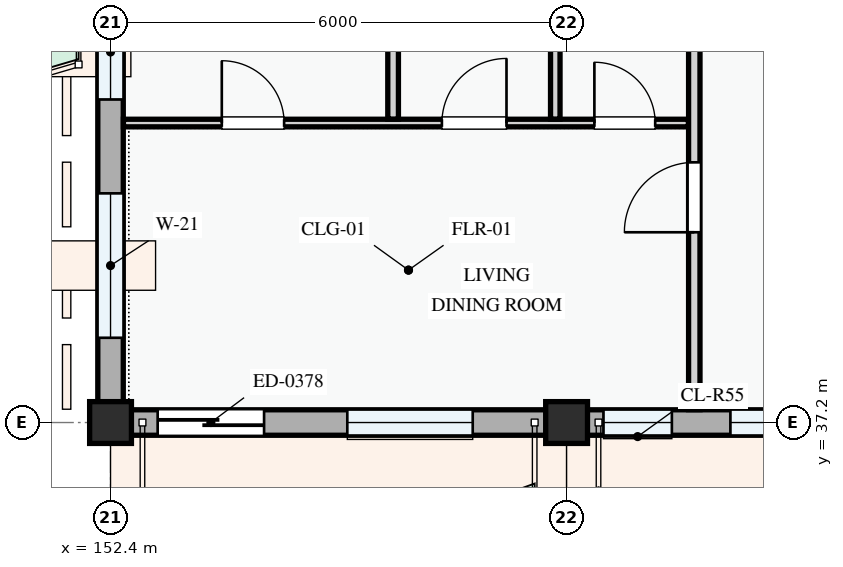
"""IFC4 building model, lengths in metres.
Left out: names, types, materials, properties, quantities, classifications, styles, units other than length and angle.
Written with IfcOpenShell. Run it as: python <this file> out.ifc"""

import sys

from ifc_helpers import new_model, si_unit, direction, frame, frame_2d, origin, origin_2d, place, context, subcontext, project, spatial, rectangle, extrude, element, fill, save


model = new_model("IFC4")
c1 = context("Model", 3, precision=1e-05, world=origin(), true_north=direction((0.0, 1.0)))
c2 = subcontext(c1, "Body", "Model", "MODEL_VIEW")
j1 = project(units=[si_unit("LENGTHUNIT", "METRE"), si_unit("PLANEANGLEUNIT", "RADIAN")], contexts=[c1])
p1 = place(None, origin())
s1 = spatial("IfcSite", under=j1, at=p1, CompositionType="ELEMENT")
p2 = place(p1, origin())
s2 = spatial("IfcBuilding", under=s1, at=p2, CompositionType="ELEMENT")
p3 = place(p2, frame((0.0, 0.0, 8.1)))
s3 = spatial("IfcBuildingStorey", under=s2, at=p3, CompositionType="ELEMENT", Elevation=8.1)
for number, where, z_axis, x_axis in (
    (1, (152.4, 37.2, 0.0), (0.0, 0.0, 1.0), (1.0, 0.0, 0.0)),
    (2, (158.4, 37.2, 0.0), (0.0, 0.0, 1.0), (1.0, 0.0, 0.0)),
):
    element("IfcColumn", number, at=place(p3, frame(where, z_axis=z_axis, x_axis=x_axis)), inside=s3, PredefinedType="COLUMN", context=c2, shape_type="SweptSolid", body=[
        extrude(rectangle(XDim=0.55, YDim=0.55, at=origin_2d()), origin(), (0.0, 0.0, 1.0), 3.3),
    ])
p4 = place(p3, frame((152.4, 43.2, 0.0), z_axis=(0.0, 0.0, 1.0), x_axis=(0.0, -1.0, 0.0)))
e3 = element("IfcWall", 3, at=p4, inside=s3, PredefinedType="STANDARD", context=c2, shape_type="SweptSolid", body=[
    extrude(rectangle(XDim=6.0, YDim=0.335, at=frame_2d((3.0, 0.0))), origin(), (0.0, 0.0, 1.0), 2.575),
])
p5 = place(p4, frame((0.5, 0.0, 0.78)))
e4 = element("IfcOpeningElement", 4, at=p5, cuts=e3, PredefinedType="OPENING", context=c2, shape_type="SweptSolid", body=[
    extrude(rectangle(XDim=1.25, YDim=1.3, at=frame_2d((0.625, 0.65))), frame((0.0, 0.177, 0.0), z_axis=(0.0, -1.0, 0.0), x_axis=(1.0, 0.0, 0.0)), (0.0, 0.0, 1.0), 0.355),
])
p6 = place(p4, frame((2.985, 0.0, 0.78)))
e5 = element("IfcOpeningElement", 5, at=p6, cuts=e3, PredefinedType="OPENING", context=c2, shape_type="SweptSolid", body=[
    extrude(rectangle(XDim=1.9, YDim=1.55, at=frame_2d((0.95, 0.775))), frame((0.0, 0.177, 0.0), z_axis=(0.0, -1.0, 0.0), x_axis=(1.0, 0.0, 0.0)), (0.0, 0.0, 1.0), 0.355),
])
p7 = place(p3, frame((152.4, 37.2, 0.0), z_axis=(0.0, 0.0, 1.0), x_axis=(1.0, 0.0, 0.0)))
e6 = element("IfcWall", 6, at=p7, inside=s3, PredefinedType="STANDARD", context=c2, shape_type="SweptSolid", body=[
    extrude(rectangle(XDim=6.0, YDim=0.335, at=frame_2d((3.0, 0.0))), origin(), (0.0, 0.0, 1.0), 2.475),
])
p8 = place(p7, frame((0.62, 0.0, 0.0)))
e7 = element("IfcOpeningElement", 7, at=p8, cuts=e6, PredefinedType="OPENING", context=c2, shape_type="SweptSolid", body=[
    extrude(rectangle(XDim=1.4, YDim=2.2, at=frame_2d((0.7, 1.1))), frame((0.0, 0.177, 0.0), z_axis=(0.0, -1.0, 0.0), x_axis=(1.0, 0.0, 0.0)), (0.0, 0.0, 1.0), 0.355),
])
p9 = place(p7, frame((3.115, 0.0, 0.78)))
e8 = element("IfcOpeningElement", 8, at=p9, cuts=e6, PredefinedType="OPENING", context=c2, shape_type="SweptSolid", body=[
    extrude(rectangle(XDim=1.65, YDim=1.5, at=frame_2d((0.825, 0.75))), frame((0.0, 0.177, 0.0), z_axis=(0.0, -1.0, 0.0), x_axis=(1.0, 0.0, 0.0)), (0.0, 0.0, 1.0), 0.355),
])
p10 = place(p3, frame((158.4, 37.2, 0.0), z_axis=(0.0, 0.0, 1.0), x_axis=(1.0, 0.0, 0.0)))
e9 = element("IfcWall", 9, at=p10, inside=s3, PredefinedType="STANDARD", context=c2, shape_type="SweptSolid", body=[
    extrude(rectangle(XDim=8.4, YDim=0.335, at=frame_2d((4.2, 0.0))), origin(), (0.0, 0.0, 1.0), 2.375),
])
p11 = place(p10, frame((3.91, 0.0, 0.0)))
e10 = element("IfcOpeningElement", 10, at=p11, cuts=e9, PredefinedType="OPENING", context=c2, shape_type="SweptSolid", body=[
    extrude(rectangle(XDim=1.5, YDim=2.2, at=frame_2d((0.75, 1.1))), frame((0.0, 0.177, 0.0), z_axis=(0.0, -1.0, 0.0), x_axis=(1.0, 0.0, 0.0)), (0.0, 0.0, 1.0), 0.355),
])
p12 = place(p10, frame((0.485, 0.0, 0.78)))
e11 = element("IfcOpeningElement", 11, at=p12, cuts=e9, PredefinedType="OPENING", context=c2, shape_type="SweptSolid", body=[
    extrude(rectangle(XDim=0.9, YDim=1.2, at=frame_2d((0.45, 0.6))), frame((0.0, 0.177, 0.0), z_axis=(0.0, -1.0, 0.0), x_axis=(1.0, 0.0, 0.0)), (0.0, 0.0, 1.0), 0.355),
])
p13 = place(p10, frame((2.155, 0.0, 0.78)))
e12 = element("IfcOpeningElement", 12, at=p13, cuts=e9, PredefinedType="OPENING", context=c2, shape_type="SweptSolid", body=[
    extrude(rectangle(XDim=0.95, YDim=1.15, at=frame_2d((0.475, 0.575))), frame((0.0, 0.177, 0.0), z_axis=(0.0, -1.0, 0.0), x_axis=(1.0, 0.0, 0.0)), (0.0, 0.0, 1.0), 0.355),
])
p14 = place(p10, frame((6.025, 0.0, 0.78)))
e13 = element("IfcOpeningElement", 13, at=p14, cuts=e9, PredefinedType="OPENING", context=c2, shape_type="SweptSolid", body=[
    extrude(rectangle(XDim=1.62, YDim=1.38, at=frame_2d((0.81, 0.69))), frame((0.0, 0.177, 0.0), z_axis=(0.0, -1.0, 0.0), x_axis=(1.0, 0.0, 0.0)), (0.0, 0.0, 1.0), 0.355),
])
p15 = place(p3, frame((152.57, 41.14, 0.0), z_axis=(0.0, 0.0, 1.0), x_axis=(1.0, 0.0, 0.0)))
e14 = element("IfcWall", 14, at=p15, inside=s3, PredefinedType="PARTITIONING", context=c2, shape_type="SweptSolid", body=[
    extrude(rectangle(XDim=7.433, YDim=0.1, at=frame_2d((3.717, 0.0))), origin(), (0.0, 0.0, 1.0), 3.0),
])
p16 = place(p15, frame((1.294, 0.0, 0.0)))
e15 = element("IfcOpeningElement", 15, at=p16, cuts=e14, PredefinedType="OPENING", context=c2, shape_type="SweptSolid", body=[
    extrude(rectangle(XDim=0.82, YDim=2.08, at=frame_2d((0.41, 1.04))), frame((0.0, 0.06, 0.0), z_axis=(0.0, -1.0, 0.0), x_axis=(1.0, 0.0, 0.0)), (0.0, 0.0, 1.0), 0.12),
])
p17 = place(p15, frame((4.19, 0.0, 0.0)))
e16 = element("IfcOpeningElement", 16, at=p17, cuts=e14, PredefinedType="OPENING", context=c2, shape_type="SweptSolid", body=[
    extrude(rectangle(XDim=0.85, YDim=2.1, at=frame_2d((0.425, 1.05))), frame((0.0, 0.06, 0.0), z_axis=(0.0, -1.0, 0.0), x_axis=(1.0, 0.0, 0.0)), (0.0, 0.0, 1.0), 0.12),
])
p18 = place(p15, frame((6.196, 0.0, 0.0)))
e17 = element("IfcOpeningElement", 17, at=p18, cuts=e14, PredefinedType="OPENING", context=c2, shape_type="SweptSolid", body=[
    extrude(rectangle(XDim=0.8, YDim=2.1, at=frame_2d((0.4, 1.05))), frame((0.0, 0.06, 0.0), z_axis=(0.0, -1.0, 0.0), x_axis=(1.0, 0.0, 0.0)), (0.0, 0.0, 1.0), 0.12),
])
p19 = place(p3, frame((156.118, 41.192, 0.0), z_axis=(0.0, 0.0, 1.0), x_axis=(0.0, 1.0, 0.0)))
e18 = element("IfcWall", 18, at=p19, inside=s3, PredefinedType="PARTITIONING", context=c2, shape_type="SweptSolid", body=[
    extrude(rectangle(XDim=3.716, YDim=0.14, at=frame_2d((1.858, 0.0))), origin(), (0.0, 0.0, 1.0), 3.0),
])
p20 = place(p3, frame((158.251, 41.192, 0.0), z_axis=(0.0, 0.0, 1.0), x_axis=(0.0, 1.0, 0.0)))
e19 = element("IfcWall", 19, at=p20, inside=s3, PredefinedType="PARTITIONING", context=c2, shape_type="SweptSolid", body=[
    extrude(rectangle(XDim=3.716, YDim=0.125, at=frame_2d((1.858, 0.0))), origin(), (0.0, 0.0, 1.0), 2.425),
])
p21 = place(p3, frame((160.08, 37.369, 0.0), z_axis=(0.0, 0.0, 1.0), x_axis=(0.0, 1.0, 0.0)))
e20 = element("IfcWall", 20, at=p21, inside=s3, PredefinedType="PARTITIONING", context=c2, shape_type="SweptSolid", body=[
    extrude(rectangle(XDim=20.371, YDim=0.15, at=frame_2d((10.185, 0.0))), origin(), (0.0, 0.0, 1.0), 3.0),
])
p22 = place(p21, frame((2.333, 0.0, 0.0)))
e21 = element("IfcOpeningElement", 21, at=p22, cuts=e20, PredefinedType="OPENING", context=c2, shape_type="SweptSolid", body=[
    extrude(rectangle(XDim=0.92, YDim=2.1, at=frame_2d((0.46, 1.05))), frame((0.0, 0.085, 0.0), z_axis=(0.0, -1.0, 0.0), x_axis=(1.0, 0.0, 0.0)), (0.0, 0.0, 1.0), 0.17),
])
p23 = place(p21, frame((9.601, 0.0, 0.0)))
e22 = element("IfcOpeningElement", 22, at=p23, cuts=e20, PredefinedType="OPENING", context=c2, shape_type="SweptSolid", body=[
    extrude(rectangle(XDim=0.92, YDim=2.1, at=frame_2d((0.46, 1.05))), frame((0.0, 0.085, 0.0), z_axis=(0.0, -1.0, 0.0), x_axis=(1.0, 0.0, 0.0)), (0.0, 0.0, 1.0), 0.17),
])
p24 = place(p5, origin())
e23 = element("IfcWindow", 23, at=p24, inside=s3, PartitioningType="SINGLE_PANEL", PredefinedType="WINDOW", context=c2, shape_type="SweptSolid", body=[
    extrude(rectangle(XDim=1.25, YDim=1.3, at=frame_2d((0.625, 0.65))), frame((0.0, 0.03, 0.0), z_axis=(0.0, -1.0, 0.0), x_axis=(1.0, 0.0, 0.0)), (0.0, 0.0, 1.0), 0.06),
])
fill(e4, e23)
p25 = place(p6, origin())
e24 = element("IfcWindow", 24, at=p25, inside=s3, PartitioningType="DOUBLE_PANEL_VERTICAL", PredefinedType="WINDOW", context=c2, shape_type="SweptSolid", body=[
    extrude(rectangle(XDim=1.9, YDim=1.55, at=frame_2d((0.95, 0.775))), frame((0.0, 0.03, 0.0), z_axis=(0.0, -1.0, 0.0), x_axis=(1.0, 0.0, 0.0)), (0.0, 0.0, 1.0), 0.06),
])
fill(e5, e24)
p26 = place(p8, frame((1.4, 0.0, 0.0), z_axis=(0.0, 0.0, 1.0), x_axis=(-1.0, 0.0, 0.0)))
e25 = element("IfcDoor", 25, at=p26, inside=s3, OperationType="SLIDING_TO_LEFT", PredefinedType="DOOR", context=c2, shape_type="SweptSolid", body=[
    extrude(rectangle(XDim=1.4, YDim=2.2, at=frame_2d((0.7, 1.1))), frame((0.0, 0.025, 0.0), z_axis=(0.0, -1.0, 0.0), x_axis=(1.0, 0.0, 0.0)), (0.0, 0.0, 1.0), 0.05),
])
fill(e7, e25)
p27 = place(p9, origin())
e26 = element("IfcWindow", 26, at=p27, inside=s3, PartitioningType="DOUBLE_PANEL_VERTICAL", PredefinedType="WINDOW", context=c2, shape_type="SweptSolid", body=[
    extrude(rectangle(XDim=1.65, YDim=1.5, at=frame_2d((0.825, 0.75))), frame((0.0, 0.03, 0.0), z_axis=(0.0, -1.0, 0.0), x_axis=(1.0, 0.0, 0.0)), (0.0, 0.0, 1.0), 0.06),
])
fill(e8, e26)
p28 = place(p12, origin())
e27 = element("IfcWindow", 27, at=p28, inside=s3, PartitioningType="SINGLE_PANEL", PredefinedType="WINDOW", context=c2, shape_type="SweptSolid", body=[
    extrude(rectangle(XDim=0.9, YDim=1.2, at=frame_2d((0.45, 0.6))), frame((0.0, 0.03, 0.0), z_axis=(0.0, -1.0, 0.0), x_axis=(1.0, 0.0, 0.0)), (0.0, 0.0, 1.0), 0.06),
])
fill(e11, e27)
p29 = place(p13, origin())
e28 = element("IfcWindow", 28, at=p29, inside=s3, PartitioningType="SINGLE_PANEL", PredefinedType="WINDOW", context=c2, shape_type="SweptSolid", body=[
    extrude(rectangle(XDim=0.95, YDim=1.15, at=frame_2d((0.475, 0.575))), frame((0.0, 0.03, 0.0), z_axis=(0.0, -1.0, 0.0), x_axis=(1.0, 0.0, 0.0)), (0.0, 0.0, 1.0), 0.06),
])
fill(e12, e28)
p30 = place(p16, origin())
e29 = element("IfcDoor", 29, at=p30, inside=s3, OperationType="SINGLE_SWING_LEFT", PredefinedType="DOOR", context=c2, shape_type="SweptSolid", body=[
    extrude(rectangle(XDim=0.82, YDim=2.08, at=frame_2d((0.41, 1.04))), frame((0.0, 0.025, 0.0), z_axis=(0.0, -1.0, 0.0), x_axis=(1.0, 0.0, 0.0)), (0.0, 0.0, 1.0), 0.05),
])
fill(e15, e29)
p31 = place(p17, origin())
e30 = element("IfcDoor", 30, at=p31, inside=s3, OperationType="SINGLE_SWING_RIGHT", PredefinedType="DOOR", context=c2, shape_type="SweptSolid", body=[
    extrude(rectangle(XDim=0.85, YDim=2.1, at=frame_2d((0.425, 1.05))), frame((0.0, 0.025, 0.0), z_axis=(0.0, -1.0, 0.0), x_axis=(1.0, 0.0, 0.0)), (0.0, 0.0, 1.0), 0.05),
])
fill(e16, e30)
p32 = place(p18, origin())
e31 = element("IfcDoor", 31, at=p32, inside=s3, OperationType="SINGLE_SWING_LEFT", PredefinedType="DOOR", context=c2, shape_type="SweptSolid", body=[
    extrude(rectangle(XDim=0.8, YDim=2.1, at=frame_2d((0.4, 1.05))), frame((0.0, 0.025, 0.0), z_axis=(0.0, -1.0, 0.0), x_axis=(1.0, 0.0, 0.0)), (0.0, 0.0, 1.0), 0.05),
])
fill(e17, e31)
p33 = place(p22, origin())
e32 = element("IfcDoor", 32, at=p33, inside=s3, OperationType="SINGLE_SWING_LEFT", PredefinedType="DOOR", context=c2, shape_type="SweptSolid", body=[
    extrude(rectangle(XDim=0.92, YDim=2.1, at=frame_2d((0.46, 1.05))), frame((0.0, 0.025, 0.0), z_axis=(0.0, -1.0, 0.0), x_axis=(1.0, 0.0, 0.0)), (0.0, 0.0, 1.0), 0.05),
])
fill(e21, e32)
save(model, sys.argv[1])
